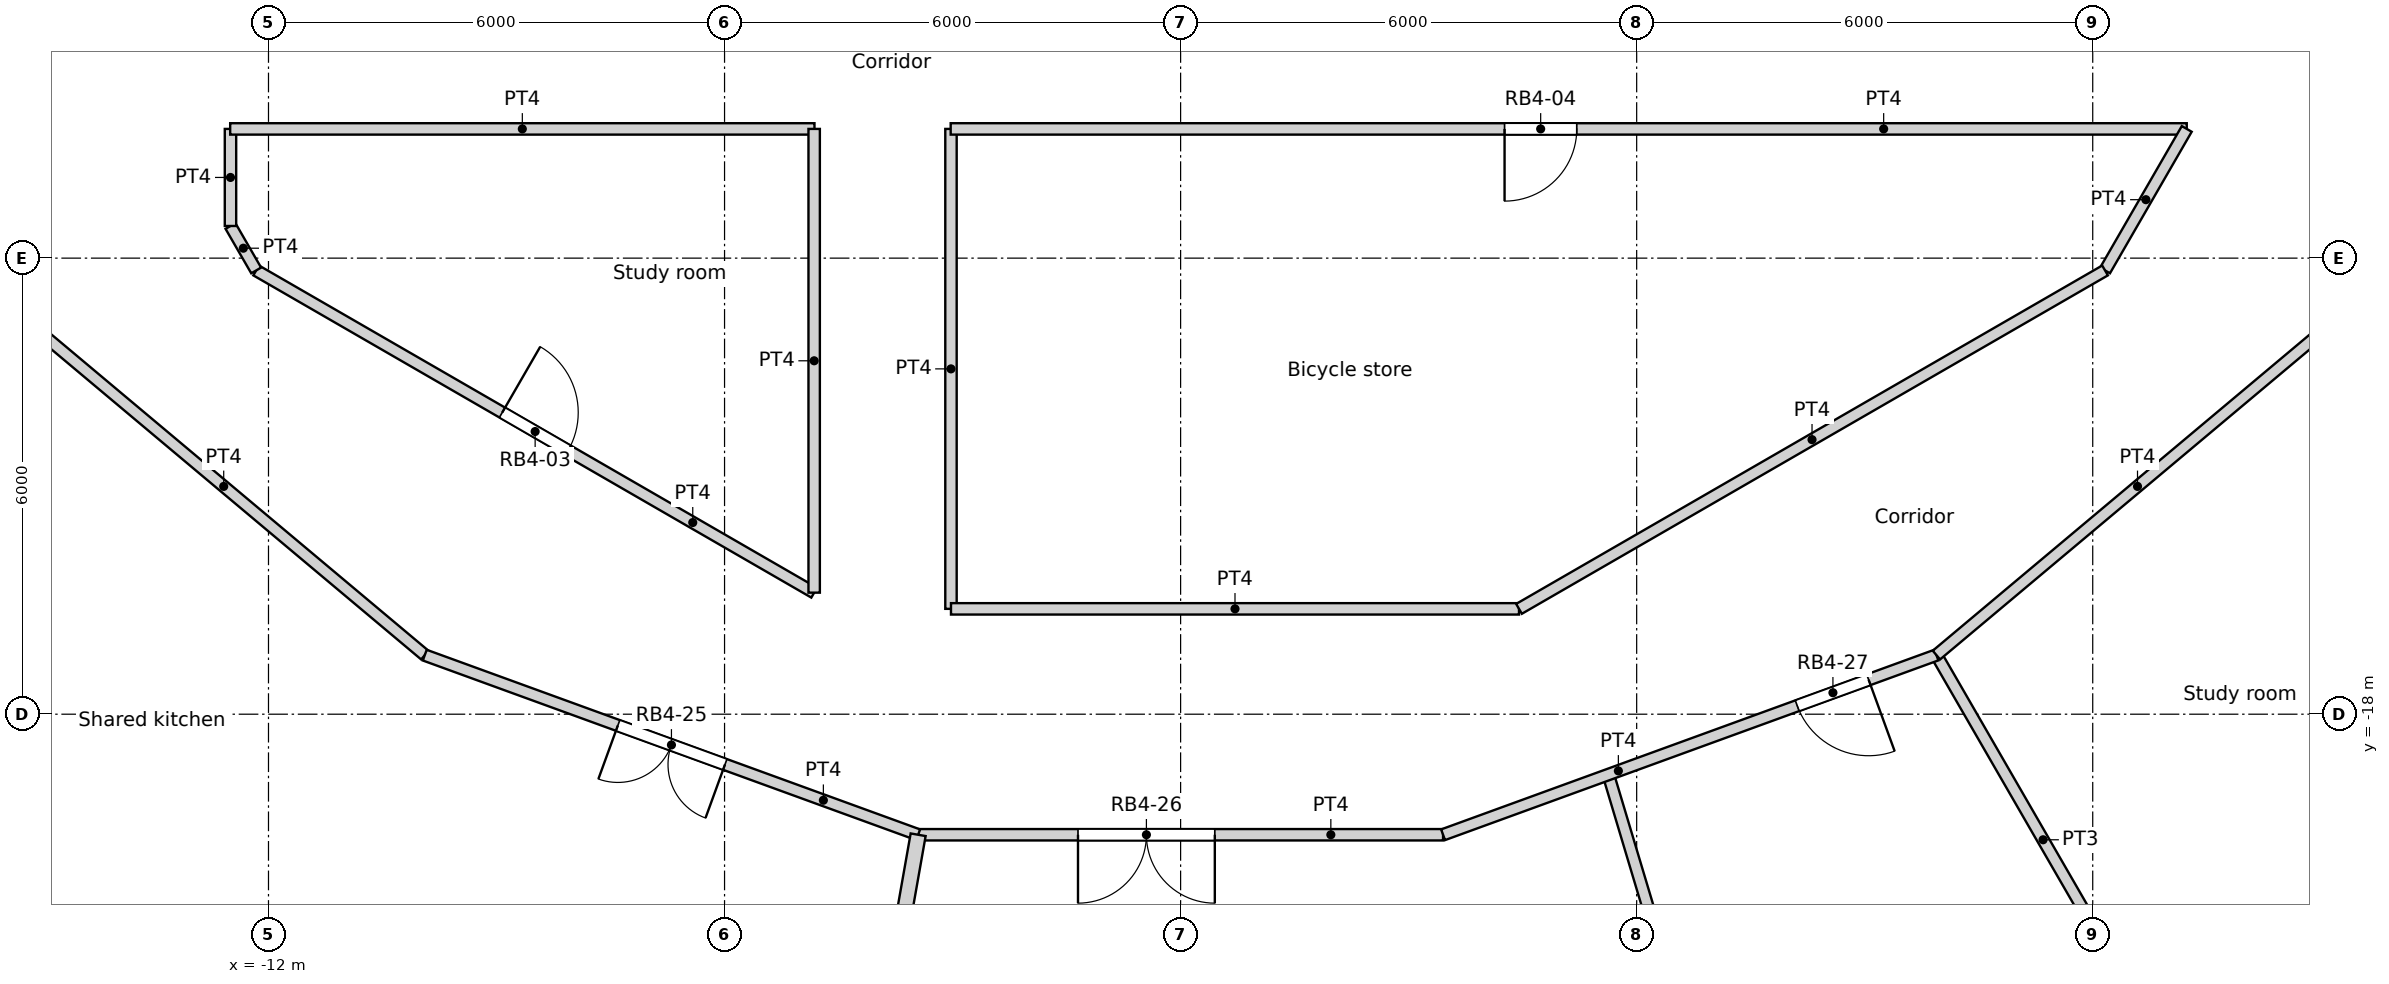
"""IFC4 building model, lengths in metres.
Left out: names, types, materials, properties, quantities, classifications, styles, units other than length and angle.
Written with IfcOpenShell. Run it as: python <this file> out.ifc"""

import sys

from ifc_helpers import new_model, si_unit, direction, frame, frame_2d, origin, origin_2d, place, context, subcontext, project, spatial, rectangle, circle, extrude, element, fill, save


model = new_model("IFC4")
c1 = context("Model", 3, precision=1e-05, world=origin(), true_north=direction((0.0, 1.0)))
c2 = subcontext(c1, "Body", "Model", "MODEL_VIEW")
j1 = project(units=[si_unit("LENGTHUNIT", "METRE"), si_unit("PLANEANGLEUNIT", "RADIAN")], contexts=[c1])
p1 = place(None, origin())
s1 = spatial("IfcSite", under=j1, at=p1, CompositionType="ELEMENT")
p2 = place(p1, origin())
s2 = spatial("IfcBuilding", under=s1, at=p2, CompositionType="ELEMENT")
p3 = place(p2, frame((0.0, 0.0, 158.4)))
s3 = spatial("IfcBuildingStorey", under=s2, at=p3, CompositionType="ELEMENT", Elevation=158.4)
p4 = place(p3, frame((14.659, -19.69, 0.0), z_axis=(0.0, 0.0, 1.0), x_axis=(1.0, 0.0, 0.0)))
e1 = element("IfcColumn", 1, at=p4, inside=s3, PredefinedType="COLUMN", context=c2, shape_type="SweptSolid", body=[
    extrude(circle(Radius=0.6, at=origin_2d()), origin(), (0.0, 0.0, 1.0), 3.6),
])
for number, where, z_axis, x_axis in (
    (2, (-13.798, -12.802, 0.0), (0.0, 0.0, 1.0), (1.0, 0.0, 0.0)),
    (3, (-9.411, -16.301, 0.0), (0.0, 0.0, 1.0), (1.0, 0.0, 0.0)),
    (4, (-4.188, -18.35, 0.0), (0.0, 0.0, 1.0), (1.0, 0.0, 0.0)),
    (5, (1.406, -18.77, 0.0), (0.0, 0.0, 1.0), (1.0, 0.0, 0.0)),
    (6, (6.876, -17.521, 0.0), (0.0, 0.0, 1.0), (1.0, 0.0, 0.0)),
    (7, (11.735, -14.716, 0.0), (0.0, 0.0, 1.0), (1.0, 0.0, 0.0)),
):
    element("IfcColumn", number, at=place(p3, frame(where, z_axis=z_axis, x_axis=x_axis)), inside=s3, PredefinedType="COLUMN", context=c2, shape_type="SweptSolid", body=[
        extrude(circle(Radius=0.65, at=origin_2d()), origin(), (0.0, 0.0, 1.0), 3.6),
    ])
p5 = place(p3, frame((-15.308, -20.578, 0.0), z_axis=(0.0, 0.0, 1.0), x_axis=(0.835470659512, -0.549535055382, 0.0)))
e8 = element("IfcWall", 8, at=p5, inside=s3, PredefinedType="SOLIDWALL", context=c2, shape_type="SweptSolid", body=[
    extrude(rectangle(XDim=2.973, YDim=0.3, at=frame_2d((1.487, 0.0))), origin(), (0.0, 0.0, 1.0), 3.3),
])
p6 = place(p5, frame((1.486, 0.0, 1.55)))
e9 = element("IfcOpeningElement", 9, at=p6, cuts=e8, PredefinedType="OPENING", context=c2, shape_type="SweptSolid", body=[
    extrude(circle(Radius=0.9, at=origin_2d()), frame((0.0, 0.16, 0.0), z_axis=(0.0, -1.0, 0.0), x_axis=(1.0, 0.0, 0.0)), (0.0, 0.0, 1.0), 0.32),
])
p7 = place(p3, frame((12.824, -22.211, 0.0), z_axis=(0.0, 0.0, 1.0), x_axis=(0.835470659512, 0.549535055382, 0.0)))
e10 = element("IfcWall", 10, at=p7, inside=s3, PredefinedType="SOLIDWALL", context=c2, shape_type="SweptSolid", body=[
    extrude(rectangle(XDim=2.973, YDim=0.3, at=frame_2d((1.487, 0.0))), origin(), (0.0, 0.0, 1.0), 3.3),
])
p8 = place(p7, frame((1.486, 0.0, 1.55)))
e11 = element("IfcOpeningElement", 11, at=p8, cuts=e10, PredefinedType="OPENING", context=c2, shape_type="SweptSolid", body=[
    extrude(circle(Radius=0.9, at=origin_2d()), frame((0.0, 0.16, 0.0), z_axis=(0.0, -1.0, 0.0), x_axis=(1.0, 0.0, 0.0)), (0.0, 0.0, 1.0), 0.32),
])
p9 = place(p3, frame((-12.504, -10.3, 0.0), z_axis=(0.0, 0.0, 1.0), x_axis=(1.0, 0.0, 0.0)))
e12 = element("IfcWall", 12, at=p9, inside=s3, PredefinedType="PARTITIONING", context=c2, shape_type="SweptSolid", body=[
    extrude(rectangle(XDim=7.687, YDim=0.15, at=frame_2d((3.844, 0.0))), origin(), (0.0, 0.0, 1.0), 3.3),
])
p10 = place(p3, frame((-3.025, -10.3, 0.0), z_axis=(0.0, 0.0, 1.0), x_axis=(1.0, 0.0, 0.0)))
e13 = element("IfcWall", 13, at=p10, inside=s3, PredefinedType="PARTITIONING", context=c2, shape_type="SweptSolid", body=[
    extrude(rectangle(XDim=16.262, YDim=0.15, at=frame_2d((8.131, 0.0))), origin(), (0.0, 0.0, 1.0), 3.3),
])
p11 = place(p10, frame((7.287, 0.0, 0.0)))
e14 = element("IfcOpeningElement", 14, at=p11, cuts=e13, PredefinedType="OPENING", context=c2, shape_type="SweptSolid", body=[
    extrude(rectangle(XDim=0.95, YDim=2.1, at=frame_2d((0.475, 1.05))), frame((0.0, 0.075, 0.0), z_axis=(0.0, -1.0, 0.0), x_axis=(1.0, 0.0, 0.0)), (0.0, 0.0, 1.0), 0.15),
])
p12 = place(p3, frame((12.162, -12.162, 0.0), z_axis=(0.0, 0.0, 1.0), x_axis=(0.499961633463, 0.866047553582, 0.0)))
e15 = element("IfcWall", 15, at=p12, inside=s3, PredefinedType="PARTITIONING", context=c2, shape_type="SweptSolid", body=[
    extrude(rectangle(XDim=2.15, YDim=0.15, at=frame_2d((1.075, 0.0))), origin(), (0.0, 0.0, 1.0), 3.3),
])
p13 = place(p3, frame((9.943, -17.222, 0.0), z_axis=(0.0, 0.0, 1.0), x_axis=(0.766192104565, 0.642611592567, 0.0)))
e16 = element("IfcWall", 16, at=p13, inside=s3, PredefinedType="PARTITIONING", context=c2, shape_type="SweptSolid", body=[
    extrude(rectangle(XDim=6.906, YDim=0.15, at=frame_2d((3.453, 0.0))), origin(), (0.0, 0.0, 1.0), 3.3),
])
p14 = place(p3, frame((-12.5, -11.577, 0.0), z_axis=(0.0, 0.0, 1.0), x_axis=(0.0, 1.0, 0.0)))
e17 = element("IfcWall", 17, at=p14, inside=s3, PredefinedType="PARTITIONING", context=c2, shape_type="SweptSolid", body=[
    extrude(rectangle(XDim=1.277, YDim=0.15, at=frame_2d((0.638, 0.0))), origin(), (0.0, 0.0, 1.0), 3.3),
])
p15 = place(p3, frame((-12.5, -11.577, 0.0), z_axis=(0.0, 0.0, 1.0), x_axis=(0.500024767483, -0.866011103799, 0.0)))
e18 = element("IfcWall", 18, at=p15, inside=s3, PredefinedType="PARTITIONING", context=c2, shape_type="SweptSolid", body=[
    extrude(rectangle(XDim=0.676, YDim=0.15, at=frame_2d((0.338, 0.0))), origin(), (0.0, 0.0, 1.0), 3.3),
])
p16 = place(p3, frame((-15.235, -12.784, 0.0), z_axis=(0.0, 0.0, 1.0), x_axis=(0.766192104565, -0.642611592567, 0.0)))
e19 = element("IfcWall", 19, at=p16, inside=s3, PredefinedType="PARTITIONING", context=c2, shape_type="SweptSolid", body=[
    extrude(rectangle(XDim=6.906, YDim=0.15, at=frame_2d((3.453, 0.0))), origin(), (0.0, 0.0, 1.0), 3.3),
])
p17 = place(p3, frame((-12.162, -12.162, 0.0), z_axis=(0.0, 0.0, 1.0), x_axis=(0.866004766557, -0.500035743023, 0.0)))
e20 = element("IfcWall", 20, at=p17, inside=s3, PredefinedType="PARTITIONING", context=c2, shape_type="SweptSolid", body=[
    extrude(rectangle(XDim=8.477, YDim=0.15, at=frame_2d((4.239, 0.0))), origin(), (0.0, 0.0, 1.0), 3.3),
])
p18 = place(p17, frame((3.738, 0.0, 0.0)))
e21 = element("IfcOpeningElement", 21, at=p18, cuts=e20, PredefinedType="OPENING", context=c2, shape_type="SweptSolid", body=[
    extrude(rectangle(XDim=1.0, YDim=2.04, at=frame_2d((0.5, 1.02))), frame((0.0, 0.075, 0.0), z_axis=(0.0, -1.0, 0.0), x_axis=(1.0, 0.0, 0.0)), (0.0, 0.0, 1.0), 0.15),
])
p19 = place(p3, frame((-4.821, -16.401, 0.0), z_axis=(0.0, 0.0, 1.0), x_axis=(0.0, 1.0, 0.0)))
e22 = element("IfcWall", 22, at=p19, inside=s3, PredefinedType="PARTITIONING", context=c2, shape_type="SweptSolid", body=[
    extrude(rectangle(XDim=6.101, YDim=0.15, at=frame_2d((3.05, 0.0))), origin(), (0.0, 0.0, 1.0), 3.3),
])
p20 = place(p3, frame((-3.021, -16.614, 0.0), z_axis=(0.0, 0.0, 1.0), x_axis=(0.0, 1.0, 0.0)))
e23 = element("IfcWall", 23, at=p20, inside=s3, PredefinedType="PARTITIONING", context=c2, shape_type="SweptSolid", body=[
    extrude(rectangle(XDim=6.314, YDim=0.15, at=frame_2d((3.157, 0.0))), origin(), (0.0, 0.0, 1.0), 3.3),
])
p21 = place(p3, frame((-3.021, -16.614, 0.0), z_axis=(0.0, 0.0, 1.0), x_axis=(1.0, 0.0, 0.0)))
e24 = element("IfcWall", 24, at=p21, inside=s3, PredefinedType="PARTITIONING", context=c2, shape_type="SweptSolid", body=[
    extrude(rectangle(XDim=7.473, YDim=0.15, at=frame_2d((3.736, 0.0))), origin(), (0.0, 0.0, 1.0), 3.3),
])
p22 = place(p3, frame((4.452, -16.614, 0.0), z_axis=(0.0, 0.0, 1.0), x_axis=(0.866005203721, 0.500034985904, 0.0)))
e25 = element("IfcWall", 25, at=p22, inside=s3, PredefinedType="PARTITIONING", context=c2, shape_type="SweptSolid", body=[
    extrude(rectangle(XDim=8.903, YDim=0.15, at=frame_2d((4.452, 0.0))), origin(), (0.0, 0.0, 1.0), 3.3),
])
p23 = place(p3, frame((-9.944, -17.223, 0.0), z_axis=(0.0, 0.0, 1.0), x_axis=(0.939672634566, -0.342075050021, 0.0)))
e26 = element("IfcWall", 26, at=p23, inside=s3, PredefinedType="PARTITIONING", context=c2, shape_type="SweptSolid", body=[
    extrude(rectangle(XDim=6.908, YDim=0.15, at=frame_2d((3.454, 0.0))), origin(), (0.0, 0.0, 1.0), 3.3),
])
p24 = place(p23, frame((2.704, 0.0, 0.0)))
e27 = element("IfcOpeningElement", 27, at=p24, cuts=e26, PredefinedType="OPENING", context=c2, shape_type="SweptSolid", body=[
    extrude(rectangle(XDim=1.5, YDim=2.1, at=frame_2d((0.75, 1.05))), frame((0.0, 0.075, 0.0), z_axis=(0.0, -1.0, 0.0), x_axis=(1.0, 0.0, 0.0)), (0.0, 0.0, 1.0), 0.15),
])
p25 = place(p3, frame((3.453, -19.586, 0.0), z_axis=(0.0, 0.0, 1.0), x_axis=(0.939607544688, 0.342253797591, 0.0)))
e28 = element("IfcWall", 28, at=p25, inside=s3, PredefinedType="PARTITIONING", context=c2, shape_type="SweptSolid", body=[
    extrude(rectangle(XDim=6.908, YDim=0.15, at=frame_2d((3.454, 0.0))), origin(), (0.0, 0.0, 1.0), 3.3),
])
p26 = place(p25, frame((4.959, 0.0, 0.0)))
e29 = element("IfcOpeningElement", 29, at=p26, cuts=e28, PredefinedType="OPENING", context=c2, shape_type="SweptSolid", body=[
    extrude(rectangle(XDim=1.0, YDim=2.04, at=frame_2d((0.5, 1.02))), frame((0.0, 0.075, 0.0), z_axis=(0.0, -1.0, 0.0), x_axis=(1.0, 0.0, 0.0)), (0.0, 0.0, 1.0), 0.15),
])
p27 = place(p3, frame((-3.453, -19.586, 0.0), z_axis=(0.0, 0.0, 1.0), x_axis=(1.0, 0.0, 0.0)))
e30 = element("IfcWall", 30, at=p27, inside=s3, PredefinedType="PARTITIONING", context=c2, shape_type="SweptSolid", body=[
    extrude(rectangle(XDim=6.906, YDim=0.15, at=frame_2d((3.453, 0.0))), origin(), (0.0, 0.0, 1.0), 3.3),
])
p28 = place(p27, frame((2.103, 0.0, 0.0)))
e31 = element("IfcOpeningElement", 31, at=p28, cuts=e30, PredefinedType="OPENING", context=c2, shape_type="SweptSolid", body=[
    extrude(rectangle(XDim=1.8, YDim=2.1, at=frame_2d((0.9, 1.05))), frame((0.0, 0.075, 0.0), z_axis=(0.0, -1.0, 0.0), x_axis=(1.0, 0.0, 0.0)), (0.0, 0.0, 1.0), 0.15),
])
p29 = place(p3, frame((-4.428, -25.11, 0.0), z_axis=(0.0, 0.0, 1.0), x_axis=(0.17382754149, 0.984776109489, 0.0)))
e32 = element("IfcWall", 32, at=p29, inside=s3, PredefinedType="PARTITIONING", context=c2, shape_type="SweptSolid", body=[
    extrude(rectangle(XDim=5.61, YDim=0.2, at=frame_2d((2.805, 0.0))), origin(), (0.0, 0.0, 1.0), 3.3),
])
p30 = place(p3, frame((5.627, -18.795, 0.0), z_axis=(0.0, 0.0, 1.0), x_axis=(0.286833432865, -0.957980470464, 0.0)))
e33 = element("IfcWall", 33, at=p30, inside=s3, PredefinedType="PARTITIONING", context=c2, shape_type="SweptSolid", body=[
    extrude(rectangle(XDim=5.878, YDim=0.15, at=frame_2d((2.939, 0.0))), origin(), (0.0, 0.0, 1.0), 3.3),
])
p31 = place(p3, frame((9.944, -17.223, 0.0), z_axis=(0.0, 0.0, 1.0), x_axis=(0.500010020406, -0.866019618423, 0.0)))
e34 = element("IfcWall", 34, at=p31, inside=s3, PredefinedType="PARTITIONING", context=c2, shape_type="SweptSolid", body=[
    extrude(rectangle(XDim=5.61, YDim=0.15, at=frame_2d((2.805, 0.0))), origin(), (0.0, 0.0, 1.0), 3.3),
])
p32 = place(p18, origin())
e35 = element("IfcDoor", 35, at=p32, inside=s3, OperationType="SINGLE_SWING_LEFT", PredefinedType="DOOR", context=c2, shape_type="SweptSolid", body=[
    extrude(rectangle(XDim=1.0, YDim=2.04, at=frame_2d((0.5, 1.02))), frame((0.0, 0.025, 0.0), z_axis=(0.0, -1.0, 0.0), x_axis=(1.0, 0.0, 0.0)), (0.0, 0.0, 1.0), 0.05),
])
fill(e21, e35)
p33 = place(p11, origin())
e36 = element("IfcDoor", 36, at=p33, inside=s3, OperationType="SINGLE_SWING_RIGHT", PredefinedType="DOOR", context=c2, shape_type="SweptSolid", body=[
    extrude(rectangle(XDim=0.95, YDim=2.1, at=frame_2d((0.475, 1.05))), frame((0.0, 0.025, 0.0), z_axis=(0.0, -1.0, 0.0), x_axis=(1.0, 0.0, 0.0)), (0.0, 0.0, 1.0), 0.05),
])
fill(e14, e36)
p34 = place(p24, origin())
e37 = element("IfcDoor", 37, at=p34, inside=s3, OperationType="DOUBLE_DOOR_SINGLE_SWING", PredefinedType="DOOR", context=c2, shape_type="SweptSolid", body=[
    extrude(rectangle(XDim=1.5, YDim=2.1, at=frame_2d((0.75, 1.05))), frame((0.0, 0.025, 0.0), z_axis=(0.0, -1.0, 0.0), x_axis=(1.0, 0.0, 0.0)), (0.0, 0.0, 1.0), 0.05),
])
fill(e27, e37)
p35 = place(p28, origin())
e38 = element("IfcDoor", 38, at=p35, inside=s3, OperationType="DOUBLE_DOOR_SINGLE_SWING", PredefinedType="DOOR", context=c2, shape_type="SweptSolid", body=[
    extrude(rectangle(XDim=1.8, YDim=2.1, at=frame_2d((0.9, 1.05))), frame((0.0, 0.025, 0.0), z_axis=(0.0, -1.0, 0.0), x_axis=(1.0, 0.0, 0.0)), (0.0, 0.0, 1.0), 0.05),
])
fill(e31, e38)
p36 = place(p26, origin())
e39 = element("IfcDoor", 39, at=p36, inside=s3, OperationType="SINGLE_SWING_LEFT", PredefinedType="DOOR", context=c2, shape_type="SweptSolid", body=[
    extrude(rectangle(XDim=1.0, YDim=2.04, at=frame_2d((0.5, 1.02))), frame((0.0, 0.025, 0.0), z_axis=(0.0, -1.0, 0.0), x_axis=(1.0, 0.0, 0.0)), (0.0, 0.0, 1.0), 0.05),
])
fill(e29, e39)
save(model, sys.argv[1])
